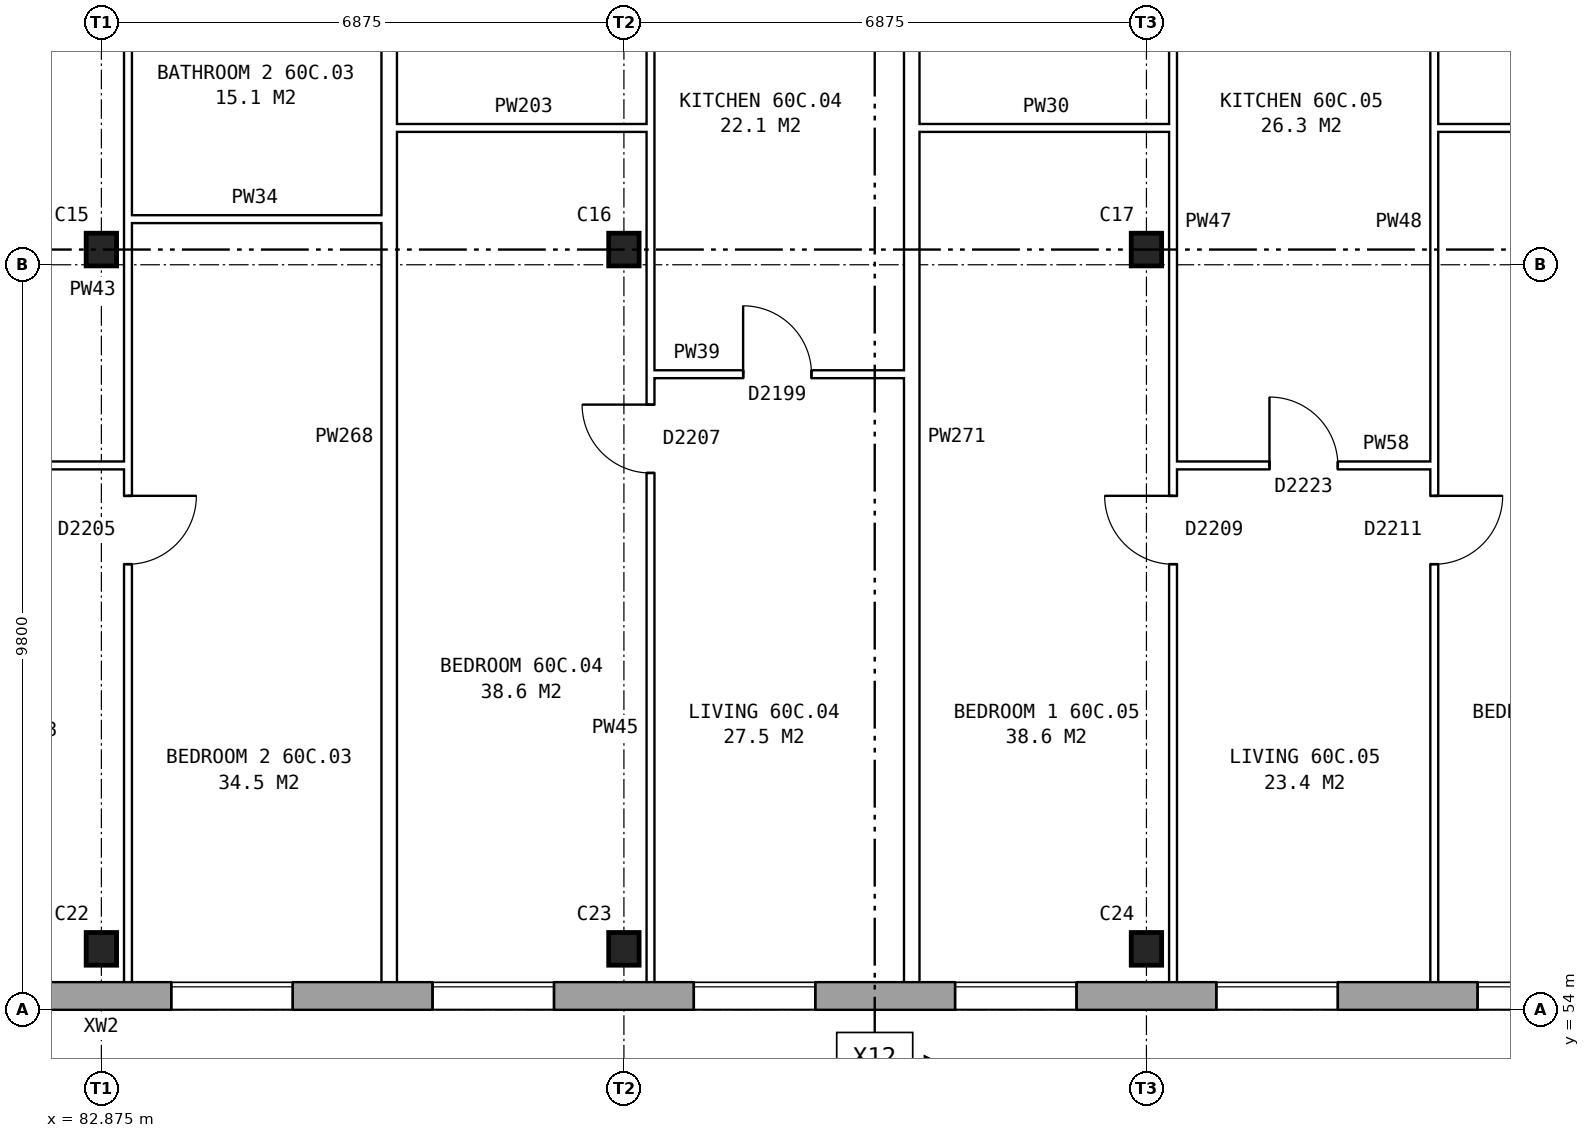
"""IFC4 building model, lengths in metres.
Left out: names, types, materials, properties, quantities, classifications, styles, units other than length and angle.
Written with IfcOpenShell. Run it as: python <this file> out.ifc"""

import sys

from ifc_helpers import new_model, si_unit, direction, frame, frame_2d, origin, origin_2d, place, context, subcontext, project, spatial, rectangle, i_section, extrude, element, fill, save


model = new_model("IFC4")
c1 = context("Model", 3, precision=1e-05, world=origin(), true_north=direction((0.0, 1.0)))
c2 = subcontext(c1, "Body", "Model", "MODEL_VIEW")
j1 = project(units=[si_unit("LENGTHUNIT", "METRE"), si_unit("PLANEANGLEUNIT", "RADIAN")], contexts=[c1])
p1 = place(None, origin())
s1 = spatial("IfcSite", under=j1, at=p1, CompositionType="ELEMENT")
p2 = place(p1, origin())
s2 = spatial("IfcBuilding", under=s1, at=p2, CompositionType="ELEMENT")
p3 = place(p2, frame((0.0, 0.0, 212.1)))
s3 = spatial("IfcBuildingStorey", under=s2, at=p3, CompositionType="ELEMENT", Elevation=212.1)
for number, where, z_axis, x_axis in (
    (1, (82.875, 54.8, 0.0), (0.0, 0.0, 1.0), (1.0, 0.0, 0.0)),
    (2, (89.75, 54.8, 0.0), (0.0, 0.0, 1.0), (1.0, 0.0, 0.0)),
    (3, (96.625, 54.8, 0.0), (0.0, 0.0, 1.0), (1.0, 0.0, 0.0)),
    (4, (82.875, 64.0, 0.0), (0.0, 0.0, 1.0), (1.0, 0.0, 0.0)),
    (5, (89.75, 64.0, 0.0), (0.0, 0.0, 1.0), (1.0, 0.0, 0.0)),
    (6, (96.625, 64.0, 0.0), (0.0, 0.0, 1.0), (1.0, 0.0, 0.0)),
):
    element("IfcColumn", number, at=place(p3, frame(where, z_axis=z_axis, x_axis=x_axis)), inside=s3, PredefinedType="COLUMN", context=c2, shape_type="SweptSolid", body=[
        extrude(i_section(OverallWidth=0.4, OverallDepth=0.43, WebThickness=0.04, FlangeThickness=0.04, at=origin_2d()), origin(), (0.0, 0.0, 1.0), 2.85),
    ])
p4 = place(p3, frame((75.95, 54.18, 0.0), z_axis=(0.0, 0.0, 1.0), x_axis=(1.0, 0.0, 0.0)))
e7 = element("IfcWall", 7, at=p4, inside=s3, PredefinedType="STANDARD", context=c2, shape_type="SweptSolid", body=[
    extrude(rectangle(XDim=55.1, YDim=0.36, at=frame_2d((27.55, 0.0))), origin(), (0.0, 0.0, 1.0), 2.85),
])
p5 = place(p4, frame((0.969, 0.0, 0.8)))
e8 = element("IfcOpeningElement", 8, at=p5, cuts=e7, PredefinedType="OPENING", context=c2, shape_type="SweptSolid", body=[
    extrude(rectangle(XDim=1.6, YDim=1.8, at=frame_2d((0.8, 0.9))), frame((0.0, 0.19, 0.0), z_axis=(0.0, -1.0, 0.0), x_axis=(1.0, 0.0, 0.0)), (0.0, 0.0, 1.0), 0.38),
])
p6 = place(p4, frame((4.406, 0.0, 0.8)))
e9 = element("IfcOpeningElement", 9, at=p6, cuts=e7, PredefinedType="OPENING", context=c2, shape_type="SweptSolid", body=[
    extrude(rectangle(XDim=1.6, YDim=1.8, at=frame_2d((0.8, 0.9))), frame((0.0, 0.19, 0.0), z_axis=(0.0, -1.0, 0.0), x_axis=(1.0, 0.0, 0.0)), (0.0, 0.0, 1.0), 0.38),
])
p7 = place(p4, frame((7.844, 0.0, 0.8)))
e10 = element("IfcOpeningElement", 10, at=p7, cuts=e7, PredefinedType="OPENING", context=c2, shape_type="SweptSolid", body=[
    extrude(rectangle(XDim=1.6, YDim=1.8, at=frame_2d((0.8, 0.9))), frame((0.0, 0.19, 0.0), z_axis=(0.0, -1.0, 0.0), x_axis=(1.0, 0.0, 0.0)), (0.0, 0.0, 1.0), 0.38),
])
p8 = place(p4, frame((11.281, 0.0, 0.8)))
e11 = element("IfcOpeningElement", 11, at=p8, cuts=e7, PredefinedType="OPENING", context=c2, shape_type="SweptSolid", body=[
    extrude(rectangle(XDim=1.6, YDim=1.8, at=frame_2d((0.8, 0.9))), frame((0.0, 0.19, 0.0), z_axis=(0.0, -1.0, 0.0), x_axis=(1.0, 0.0, 0.0)), (0.0, 0.0, 1.0), 0.38),
])
p9 = place(p4, frame((14.719, 0.0, 0.8)))
e12 = element("IfcOpeningElement", 12, at=p9, cuts=e7, PredefinedType="OPENING", context=c2, shape_type="SweptSolid", body=[
    extrude(rectangle(XDim=1.6, YDim=1.8, at=frame_2d((0.8, 0.9))), frame((0.0, 0.19, 0.0), z_axis=(0.0, -1.0, 0.0), x_axis=(1.0, 0.0, 0.0)), (0.0, 0.0, 1.0), 0.38),
])
p10 = place(p4, frame((18.156, 0.0, 0.8)))
e13 = element("IfcOpeningElement", 13, at=p10, cuts=e7, PredefinedType="OPENING", context=c2, shape_type="SweptSolid", body=[
    extrude(rectangle(XDim=1.6, YDim=1.8, at=frame_2d((0.8, 0.9))), frame((0.0, 0.19, 0.0), z_axis=(0.0, -1.0, 0.0), x_axis=(1.0, 0.0, 0.0)), (0.0, 0.0, 1.0), 0.38),
])
p11 = place(p4, frame((21.594, 0.0, 0.8)))
e14 = element("IfcOpeningElement", 14, at=p11, cuts=e7, PredefinedType="OPENING", context=c2, shape_type="SweptSolid", body=[
    extrude(rectangle(XDim=1.6, YDim=1.8, at=frame_2d((0.8, 0.9))), frame((0.0, 0.19, 0.0), z_axis=(0.0, -1.0, 0.0), x_axis=(1.0, 0.0, 0.0)), (0.0, 0.0, 1.0), 0.38),
])
p12 = place(p4, frame((25.031, 0.0, 0.8)))
e15 = element("IfcOpeningElement", 15, at=p12, cuts=e7, PredefinedType="OPENING", context=c2, shape_type="SweptSolid", body=[
    extrude(rectangle(XDim=1.6, YDim=1.8, at=frame_2d((0.8, 0.9))), frame((0.0, 0.19, 0.0), z_axis=(0.0, -1.0, 0.0), x_axis=(1.0, 0.0, 0.0)), (0.0, 0.0, 1.0), 0.38),
])
p13 = place(p4, frame((28.469, 0.0, 0.8)))
e16 = element("IfcOpeningElement", 16, at=p13, cuts=e7, PredefinedType="OPENING", context=c2, shape_type="SweptSolid", body=[
    extrude(rectangle(XDim=1.6, YDim=1.8, at=frame_2d((0.8, 0.9))), frame((0.0, 0.19, 0.0), z_axis=(0.0, -1.0, 0.0), x_axis=(1.0, 0.0, 0.0)), (0.0, 0.0, 1.0), 0.38),
])
p14 = place(p4, frame((31.906, 0.0, 0.8)))
e17 = element("IfcOpeningElement", 17, at=p14, cuts=e7, PredefinedType="OPENING", context=c2, shape_type="SweptSolid", body=[
    extrude(rectangle(XDim=1.6, YDim=1.8, at=frame_2d((0.8, 0.9))), frame((0.0, 0.19, 0.0), z_axis=(0.0, -1.0, 0.0), x_axis=(1.0, 0.0, 0.0)), (0.0, 0.0, 1.0), 0.38),
])
p15 = place(p4, frame((35.344, 0.0, 0.8)))
e18 = element("IfcOpeningElement", 18, at=p15, cuts=e7, PredefinedType="OPENING", context=c2, shape_type="SweptSolid", body=[
    extrude(rectangle(XDim=1.6, YDim=1.8, at=frame_2d((0.8, 0.9))), frame((0.0, 0.19, 0.0), z_axis=(0.0, -1.0, 0.0), x_axis=(1.0, 0.0, 0.0)), (0.0, 0.0, 1.0), 0.38),
])
p16 = place(p4, frame((38.781, 0.0, 0.8)))
e19 = element("IfcOpeningElement", 19, at=p16, cuts=e7, PredefinedType="OPENING", context=c2, shape_type="SweptSolid", body=[
    extrude(rectangle(XDim=1.6, YDim=1.8, at=frame_2d((0.8, 0.9))), frame((0.0, 0.19, 0.0), z_axis=(0.0, -1.0, 0.0), x_axis=(1.0, 0.0, 0.0)), (0.0, 0.0, 1.0), 0.38),
])
p17 = place(p4, frame((42.219, 0.0, 0.8)))
e20 = element("IfcOpeningElement", 20, at=p17, cuts=e7, PredefinedType="OPENING", context=c2, shape_type="SweptSolid", body=[
    extrude(rectangle(XDim=1.6, YDim=1.8, at=frame_2d((0.8, 0.9))), frame((0.0, 0.19, 0.0), z_axis=(0.0, -1.0, 0.0), x_axis=(1.0, 0.0, 0.0)), (0.0, 0.0, 1.0), 0.38),
])
p18 = place(p4, frame((45.656, 0.0, 0.8)))
e21 = element("IfcOpeningElement", 21, at=p18, cuts=e7, PredefinedType="OPENING", context=c2, shape_type="SweptSolid", body=[
    extrude(rectangle(XDim=1.6, YDim=1.8, at=frame_2d((0.8, 0.9))), frame((0.0, 0.19, 0.0), z_axis=(0.0, -1.0, 0.0), x_axis=(1.0, 0.0, 0.0)), (0.0, 0.0, 1.0), 0.38),
])
p19 = place(p4, frame((49.094, 0.0, 0.8)))
e22 = element("IfcOpeningElement", 22, at=p19, cuts=e7, PredefinedType="OPENING", context=c2, shape_type="SweptSolid", body=[
    extrude(rectangle(XDim=1.6, YDim=1.8, at=frame_2d((0.8, 0.9))), frame((0.0, 0.19, 0.0), z_axis=(0.0, -1.0, 0.0), x_axis=(1.0, 0.0, 0.0)), (0.0, 0.0, 1.0), 0.38),
])
p20 = place(p4, frame((52.531, 0.0, 0.8)))
e23 = element("IfcOpeningElement", 23, at=p20, cuts=e7, PredefinedType="OPENING", context=c2, shape_type="SweptSolid", body=[
    extrude(rectangle(XDim=1.6, YDim=1.8, at=frame_2d((0.8, 0.9))), frame((0.0, 0.19, 0.0), z_axis=(0.0, -1.0, 0.0), x_axis=(1.0, 0.0, 0.0)), (0.0, 0.0, 1.0), 0.38),
])
p21 = place(p3, frame((79.438, 61.16, 0.0), z_axis=(0.0, 0.0, 1.0), x_axis=(1.0, 0.0, 0.0)))
e24 = element("IfcWall", 24, at=p21, inside=s3, PredefinedType="PARTITIONING", context=c2, shape_type="SweptSolid", body=[
    extrude(rectangle(XDim=3.787, YDim=0.1, at=frame_2d((1.894, 0.0))), origin(), (0.0, 0.0, 1.0), 2.85),
])
p22 = place(p21, frame((1.444, 0.0, 0.0)))
e25 = element("IfcOpeningElement", 25, at=p22, cuts=e24, PredefinedType="OPENING", context=c2, shape_type="SweptSolid", body=[
    extrude(rectangle(XDim=0.9, YDim=2.1, at=frame_2d((0.45, 1.05))), frame((0.0, 0.06, 0.0), z_axis=(0.0, -1.0, 0.0), x_axis=(1.0, 0.0, 0.0)), (0.0, 0.0, 1.0), 0.12),
])
p23 = place(p3, frame((96.975, 61.16, 0.0), z_axis=(0.0, 0.0, 1.0), x_axis=(1.0, 0.0, 0.0)))
e26 = element("IfcWall", 26, at=p23, inside=s3, PredefinedType="PARTITIONING", context=c2, shape_type="SweptSolid", body=[
    extrude(rectangle(XDim=3.437, YDim=0.1, at=frame_2d((1.719, 0.0))), origin(), (0.0, 0.0, 1.0), 2.85),
])
p24 = place(p23, frame((1.269, 0.0, 0.0)))
e27 = element("IfcOpeningElement", 27, at=p24, cuts=e26, PredefinedType="OPENING", context=c2, shape_type="SweptSolid", body=[
    extrude(rectangle(XDim=0.9, YDim=2.1, at=frame_2d((0.45, 1.05))), frame((0.0, 0.06, 0.0), z_axis=(0.0, -1.0, 0.0), x_axis=(1.0, 0.0, 0.0)), (0.0, 0.0, 1.0), 0.12),
])
p25 = place(p3, frame((90.1, 62.36, 0.0), z_axis=(0.0, 0.0, 1.0), x_axis=(1.0, 0.0, 0.0)))
e28 = element("IfcWall", 28, at=p25, inside=s3, PredefinedType="PARTITIONING", context=c2, shape_type="SweptSolid", body=[
    extrude(rectangle(XDim=3.337, YDim=0.1, at=frame_2d((1.668, 0.0))), origin(), (0.0, 0.0, 1.0), 2.85),
])
p26 = place(p25, frame((1.219, 0.0, 0.0)))
e29 = element("IfcOpeningElement", 29, at=p26, cuts=e28, PredefinedType="OPENING", context=c2, shape_type="SweptSolid", body=[
    extrude(rectangle(XDim=0.9, YDim=2.1, at=frame_2d((0.45, 1.05))), frame((0.0, 0.06, 0.0), z_axis=(0.0, -1.0, 0.0), x_axis=(1.0, 0.0, 0.0)), (0.0, 0.0, 1.0), 0.12),
])
p27 = place(p3, frame((83.225, 64.4, 0.0), z_axis=(0.0, 0.0, 1.0), x_axis=(1.0, 0.0, 0.0)))
e30 = element("IfcWall", 30, at=p27, inside=s3, PredefinedType="PARTITIONING", context=c2, shape_type="SweptSolid", body=[
    extrude(rectangle(XDim=3.337, YDim=0.1, at=frame_2d((1.668, 0.0))), origin(), (0.0, 0.0, 1.0), 2.85),
])
for number, where, z_axis, x_axis in (
    (31, (86.762, 65.6, 0.0), (0.0, 0.0, 1.0), (1.0, 0.0, 0.0)),
    (32, (93.637, 65.6, 0.0), (0.0, 0.0, 1.0), (1.0, 0.0, 0.0)),
):
    element("IfcWall", number, at=place(p3, frame(where, z_axis=z_axis, x_axis=x_axis)), inside=s3, PredefinedType="PARTITIONING", context=c2, shape_type="SweptSolid", body=[
        extrude(rectangle(XDim=3.338, YDim=0.1, at=frame_2d((1.669, 0.0))), origin(), (0.0, 0.0, 1.0), 2.85),
    ])
p28 = place(p3, frame((100.412, 65.6, 0.0), z_axis=(0.0, 0.0, 1.0), x_axis=(1.0, 0.0, 0.0)))
e33 = element("IfcWall", 33, at=p28, inside=s3, PredefinedType="PARTITIONING", context=c2, shape_type="SweptSolid", body=[
    extrude(rectangle(XDim=6.875, YDim=0.1, at=frame_2d((3.438, 0.0))), origin(), (0.0, 0.0, 1.0), 2.85),
])
p29 = place(p3, frame((83.225, 54.36, 0.0), z_axis=(0.0, 0.0, 1.0), x_axis=(0.0, 1.0, 0.0)))
e34 = element("IfcWall", 34, at=p29, inside=s3, PredefinedType="PARTITIONING", context=c2, shape_type="SweptSolid", body=[
    extrude(rectangle(XDim=14.34, YDim=0.1, at=frame_2d((7.17, 0.0))), origin(), (0.0, 0.0, 1.0), 2.85),
])
p30 = place(p29, frame((5.5, 0.0, 0.0)))
e35 = element("IfcOpeningElement", 35, at=p30, cuts=e34, PredefinedType="OPENING", context=c2, shape_type="SweptSolid", body=[
    extrude(rectangle(XDim=0.9, YDim=2.1, at=frame_2d((0.45, 1.05))), frame((0.0, 0.06, 0.0), z_axis=(0.0, -1.0, 0.0), x_axis=(1.0, 0.0, 0.0)), (0.0, 0.0, 1.0), 0.12),
])
p31 = place(p29, frame((13.04, 0.0, 0.0)))
e36 = element("IfcOpeningElement", 36, at=p31, cuts=e34, PredefinedType="OPENING", context=c2, shape_type="SweptSolid", body=[
    extrude(rectangle(XDim=0.9, YDim=2.1, at=frame_2d((0.45, 1.05))), frame((0.0, 0.06, 0.0), z_axis=(0.0, -1.0, 0.0), x_axis=(1.0, 0.0, 0.0)), (0.0, 0.0, 1.0), 0.12),
])
p32 = place(p3, frame((86.662, 54.36, 0.0), z_axis=(0.0, 0.0, 1.0), x_axis=(0.0, 1.0, 0.0)))
e37 = element("IfcWall", 37, at=p32, inside=s3, PredefinedType="PARTITIONING", context=c2, shape_type="SweptSolid", body=[
    extrude(rectangle(XDim=14.34, YDim=0.2, at=frame_2d((7.17, 0.0))), origin(), (0.0, 0.0, 1.0), 2.85),
])
p33 = place(p3, frame((90.1, 54.36, 0.0), z_axis=(0.0, 0.0, 1.0), x_axis=(0.0, 1.0, 0.0)))
e38 = element("IfcWall", 38, at=p33, inside=s3, PredefinedType="PARTITIONING", context=c2, shape_type="SweptSolid", body=[
    extrude(rectangle(XDim=14.34, YDim=0.1, at=frame_2d((7.17, 0.0))), origin(), (0.0, 0.0, 1.0), 2.85),
])
p34 = place(p33, frame((6.7, 0.0, 0.0)))
e39 = element("IfcOpeningElement", 39, at=p34, cuts=e38, PredefinedType="OPENING", context=c2, shape_type="SweptSolid", body=[
    extrude(rectangle(XDim=0.9, YDim=2.1, at=frame_2d((0.45, 1.05))), frame((0.0, 0.06, 0.0), z_axis=(0.0, -1.0, 0.0), x_axis=(1.0, 0.0, 0.0)), (0.0, 0.0, 1.0), 0.12),
])
p35 = place(p33, frame((13.04, 0.0, 0.0)))
e40 = element("IfcOpeningElement", 40, at=p35, cuts=e38, PredefinedType="OPENING", context=c2, shape_type="SweptSolid", body=[
    extrude(rectangle(XDim=0.9, YDim=2.1, at=frame_2d((0.45, 1.05))), frame((0.0, 0.06, 0.0), z_axis=(0.0, -1.0, 0.0), x_axis=(1.0, 0.0, 0.0)), (0.0, 0.0, 1.0), 0.12),
])
p36 = place(p3, frame((93.537, 54.36, 0.0), z_axis=(0.0, 0.0, 1.0), x_axis=(0.0, 1.0, 0.0)))
e41 = element("IfcWall", 41, at=p36, inside=s3, PredefinedType="PARTITIONING", context=c2, shape_type="SweptSolid", body=[
    extrude(rectangle(XDim=14.34, YDim=0.2, at=frame_2d((7.17, 0.0))), origin(), (0.0, 0.0, 1.0), 2.85),
])
p37 = place(p3, frame((96.975, 54.36, 0.0), z_axis=(0.0, 0.0, 1.0), x_axis=(0.0, 1.0, 0.0)))
e42 = element("IfcWall", 42, at=p37, inside=s3, PredefinedType="PARTITIONING", context=c2, shape_type="SweptSolid", body=[
    extrude(rectangle(XDim=14.34, YDim=0.1, at=frame_2d((7.17, 0.0))), origin(), (0.0, 0.0, 1.0), 2.85),
])
p38 = place(p37, frame((5.5, 0.0, 0.0)))
e43 = element("IfcOpeningElement", 43, at=p38, cuts=e42, PredefinedType="OPENING", context=c2, shape_type="SweptSolid", body=[
    extrude(rectangle(XDim=0.9, YDim=2.1, at=frame_2d((0.45, 1.05))), frame((0.0, 0.06, 0.0), z_axis=(0.0, -1.0, 0.0), x_axis=(1.0, 0.0, 0.0)), (0.0, 0.0, 1.0), 0.12),
])
p39 = place(p37, frame((13.04, 0.0, 0.0)))
e44 = element("IfcOpeningElement", 44, at=p39, cuts=e42, PredefinedType="OPENING", context=c2, shape_type="SweptSolid", body=[
    extrude(rectangle(XDim=0.9, YDim=2.1, at=frame_2d((0.45, 1.05))), frame((0.0, 0.06, 0.0), z_axis=(0.0, -1.0, 0.0), x_axis=(1.0, 0.0, 0.0)), (0.0, 0.0, 1.0), 0.12),
])
p40 = place(p3, frame((100.412, 54.36, 0.0), z_axis=(0.0, 0.0, 1.0), x_axis=(0.0, 1.0, 0.0)))
e45 = element("IfcWall", 45, at=p40, inside=s3, PredefinedType="PARTITIONING", context=c2, shape_type="SweptSolid", body=[
    extrude(rectangle(XDim=14.34, YDim=0.1, at=frame_2d((7.17, 0.0))), origin(), (0.0, 0.0, 1.0), 2.85),
])
p41 = place(p40, frame((5.5, 0.0, 0.0)))
e46 = element("IfcOpeningElement", 46, at=p41, cuts=e45, PredefinedType="OPENING", context=c2, shape_type="SweptSolid", body=[
    extrude(rectangle(XDim=0.9, YDim=2.1, at=frame_2d((0.45, 1.05))), frame((0.0, 0.06, 0.0), z_axis=(0.0, -1.0, 0.0), x_axis=(1.0, 0.0, 0.0)), (0.0, 0.0, 1.0), 0.12),
])
p42 = place(p40, frame((13.04, 0.0, 0.0)))
e47 = element("IfcOpeningElement", 47, at=p42, cuts=e45, PredefinedType="OPENING", context=c2, shape_type="SweptSolid", body=[
    extrude(rectangle(XDim=0.9, YDim=2.1, at=frame_2d((0.45, 1.05))), frame((0.0, 0.06, 0.0), z_axis=(0.0, -1.0, 0.0), x_axis=(1.0, 0.0, 0.0)), (0.0, 0.0, 1.0), 0.12),
])
p43 = place(p7, origin())
e48 = element("IfcWindow", 48, at=p43, inside=s3, PartitioningType="SINGLE_PANEL", PredefinedType="WINDOW", context=c2, shape_type="SweptSolid", body=[
    extrude(rectangle(XDim=1.6, YDim=1.8, at=frame_2d((0.8, 0.9))), frame((0.0, 0.15, 0.0), z_axis=(0.0, -1.0, 0.0), x_axis=(1.0, 0.0, 0.0)), (0.0, 0.0, 1.0), 0.06),
])
fill(e10, e48)
p44 = place(p8, origin())
e49 = element("IfcWindow", 49, at=p44, inside=s3, PartitioningType="SINGLE_PANEL", PredefinedType="WINDOW", context=c2, shape_type="SweptSolid", body=[
    extrude(rectangle(XDim=1.6, YDim=1.8, at=frame_2d((0.8, 0.9))), frame((0.0, 0.15, 0.0), z_axis=(0.0, -1.0, 0.0), x_axis=(1.0, 0.0, 0.0)), (0.0, 0.0, 1.0), 0.06),
])
fill(e11, e49)
p45 = place(p9, origin())
e50 = element("IfcWindow", 50, at=p45, inside=s3, PartitioningType="SINGLE_PANEL", PredefinedType="WINDOW", context=c2, shape_type="SweptSolid", body=[
    extrude(rectangle(XDim=1.6, YDim=1.8, at=frame_2d((0.8, 0.9))), frame((0.0, 0.15, 0.0), z_axis=(0.0, -1.0, 0.0), x_axis=(1.0, 0.0, 0.0)), (0.0, 0.0, 1.0), 0.06),
])
fill(e12, e50)
p46 = place(p10, origin())
e51 = element("IfcWindow", 51, at=p46, inside=s3, PartitioningType="SINGLE_PANEL", PredefinedType="WINDOW", context=c2, shape_type="SweptSolid", body=[
    extrude(rectangle(XDim=1.6, YDim=1.8, at=frame_2d((0.8, 0.9))), frame((0.0, 0.15, 0.0), z_axis=(0.0, -1.0, 0.0), x_axis=(1.0, 0.0, 0.0)), (0.0, 0.0, 1.0), 0.06),
])
fill(e13, e51)
p47 = place(p11, origin())
e52 = element("IfcWindow", 52, at=p47, inside=s3, PartitioningType="SINGLE_PANEL", PredefinedType="WINDOW", context=c2, shape_type="SweptSolid", body=[
    extrude(rectangle(XDim=1.6, YDim=1.8, at=frame_2d((0.8, 0.9))), frame((0.0, 0.15, 0.0), z_axis=(0.0, -1.0, 0.0), x_axis=(1.0, 0.0, 0.0)), (0.0, 0.0, 1.0), 0.06),
])
fill(e14, e52)
p48 = place(p12, origin())
e53 = element("IfcWindow", 53, at=p48, inside=s3, PartitioningType="SINGLE_PANEL", PredefinedType="WINDOW", context=c2, shape_type="SweptSolid", body=[
    extrude(rectangle(XDim=1.6, YDim=1.8, at=frame_2d((0.8, 0.9))), frame((0.0, 0.15, 0.0), z_axis=(0.0, -1.0, 0.0), x_axis=(1.0, 0.0, 0.0)), (0.0, 0.0, 1.0), 0.06),
])
fill(e15, e53)
p49 = place(p30, frame((0.9, 0.0, 0.0), z_axis=(0.0, 0.0, 1.0), x_axis=(-1.0, 0.0, 0.0)))
e54 = element("IfcDoor", 54, at=p49, inside=s3, OperationType="SINGLE_SWING_LEFT", PredefinedType="DOOR", context=c2, shape_type="SweptSolid", body=[
    extrude(rectangle(XDim=0.9, YDim=2.1, at=frame_2d((0.45, 1.05))), frame((0.0, 0.025, 0.0), z_axis=(0.0, -1.0, 0.0), x_axis=(1.0, 0.0, 0.0)), (0.0, 0.0, 1.0), 0.05),
])
fill(e35, e54)
p50 = place(p34, origin())
e55 = element("IfcDoor", 55, at=p50, inside=s3, OperationType="SINGLE_SWING_RIGHT", PredefinedType="DOOR", context=c2, shape_type="SweptSolid", body=[
    extrude(rectangle(XDim=0.9, YDim=2.1, at=frame_2d((0.45, 1.05))), frame((0.0, 0.025, 0.0), z_axis=(0.0, -1.0, 0.0), x_axis=(1.0, 0.0, 0.0)), (0.0, 0.0, 1.0), 0.05),
])
fill(e39, e55)
p51 = place(p26, origin())
e56 = element("IfcDoor", 56, at=p51, inside=s3, OperationType="SINGLE_SWING_LEFT", PredefinedType="DOOR", context=c2, shape_type="SweptSolid", body=[
    extrude(rectangle(XDim=0.9, YDim=2.1, at=frame_2d((0.45, 1.05))), frame((0.0, 0.025, 0.0), z_axis=(0.0, -1.0, 0.0), x_axis=(1.0, 0.0, 0.0)), (0.0, 0.0, 1.0), 0.05),
])
fill(e29, e56)
p52 = place(p38, origin())
e57 = element("IfcDoor", 57, at=p52, inside=s3, OperationType="SINGLE_SWING_RIGHT", PredefinedType="DOOR", context=c2, shape_type="SweptSolid", body=[
    extrude(rectangle(XDim=0.9, YDim=2.1, at=frame_2d((0.45, 1.05))), frame((0.0, 0.025, 0.0), z_axis=(0.0, -1.0, 0.0), x_axis=(1.0, 0.0, 0.0)), (0.0, 0.0, 1.0), 0.05),
])
fill(e43, e57)
p53 = place(p41, frame((0.9, 0.0, 0.0), z_axis=(0.0, 0.0, 1.0), x_axis=(-1.0, 0.0, 0.0)))
e58 = element("IfcDoor", 58, at=p53, inside=s3, OperationType="SINGLE_SWING_LEFT", PredefinedType="DOOR", context=c2, shape_type="SweptSolid", body=[
    extrude(rectangle(XDim=0.9, YDim=2.1, at=frame_2d((0.45, 1.05))), frame((0.0, 0.025, 0.0), z_axis=(0.0, -1.0, 0.0), x_axis=(1.0, 0.0, 0.0)), (0.0, 0.0, 1.0), 0.05),
])
fill(e46, e58)
p54 = place(p24, origin())
e59 = element("IfcDoor", 59, at=p54, inside=s3, OperationType="SINGLE_SWING_LEFT", PredefinedType="DOOR", context=c2, shape_type="SweptSolid", body=[
    extrude(rectangle(XDim=0.9, YDim=2.1, at=frame_2d((0.45, 1.05))), frame((0.0, 0.025, 0.0), z_axis=(0.0, -1.0, 0.0), x_axis=(1.0, 0.0, 0.0)), (0.0, 0.0, 1.0), 0.05),
])
fill(e27, e59)
save(model, sys.argv[1])
